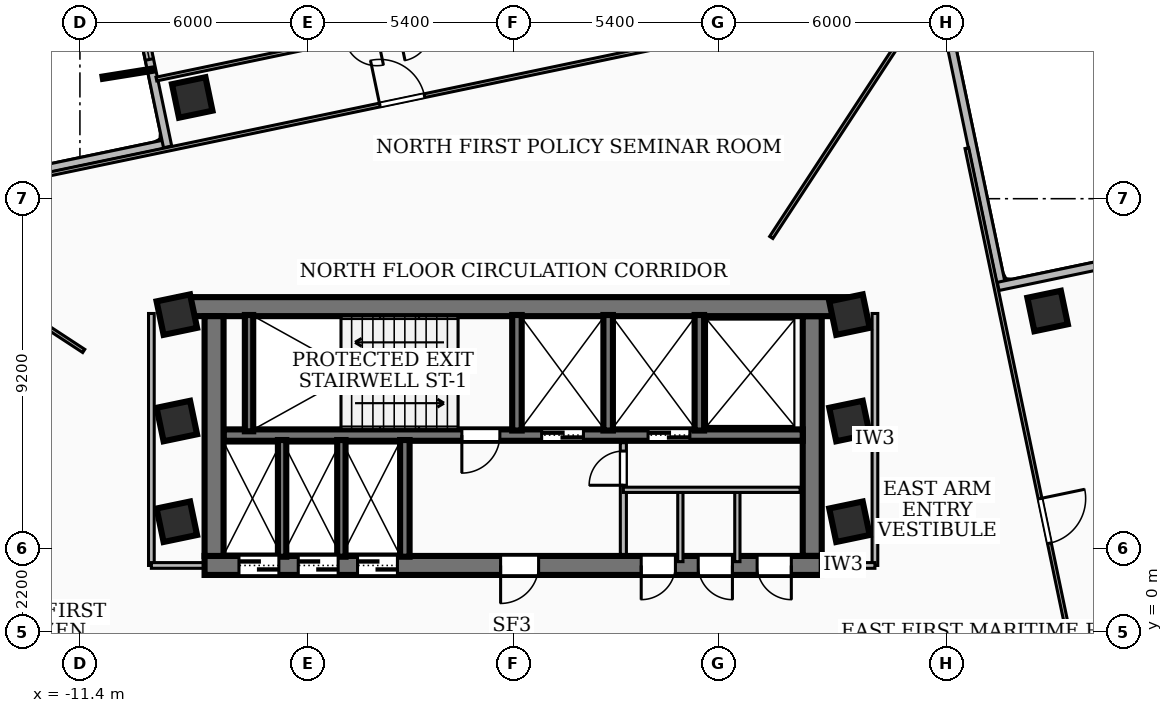
"""IFC4 building model, lengths in metres.
Left out: names, types, materials, properties, quantities, classifications, styles, units other than length and angle.
Written with IfcOpenShell. Run it as: python <this file> out.ifc"""

import sys

from ifc_helpers import new_model, si_unit, direction, frame, frame_2d, origin, origin_2d, place, context, subcontext, project, spatial, rectangle, extrude, element, fill, save


model = new_model("IFC4")
c1 = context("Model", 3, precision=1e-05, world=origin(), true_north=direction((0.0, 1.0)))
c2 = subcontext(c1, "Body", "Model", "MODEL_VIEW")
j1 = project(units=[si_unit("LENGTHUNIT", "METRE"), si_unit("PLANEANGLEUNIT", "RADIAN")], contexts=[c1])
p1 = place(None, origin())
s1 = spatial("IfcSite", under=j1, at=p1, CompositionType="ELEMENT")
p2 = place(p1, origin())
s2 = spatial("IfcBuilding", under=s1, at=p2, CompositionType="ELEMENT")
p3 = place(p2, frame((0.0, 0.0, 111.96)))
s3 = spatial("IfcBuildingStorey", under=s2, at=p3, CompositionType="ELEMENT", Elevation=111.96)
p4 = place(p3, frame((-8.78, 8.56, 0.0), z_axis=(0.0, 0.0, 1.0), x_axis=(1.0, 0.0, 0.0)))
e1 = element("IfcWall", 1, at=p4, inside=s3, PredefinedType="SHEAR", context=c2, shape_type="SweptSolid", body=[
    extrude(rectangle(XDim=17.56, YDim=0.5, at=frame_2d((8.78, 0.0))), origin(), (0.0, 0.0, 1.0), 4.06),
])
p5 = place(p3, frame((8.12, 1.75, 0.0), z_axis=(0.0, 0.0, 1.0), x_axis=(-1.0, 0.0, 0.0)))
e2 = element("IfcWall", 2, at=p5, inside=s3, PredefinedType="SHEAR", context=c2, shape_type="SweptSolid", body=[
    extrude(rectangle(XDim=16.24, YDim=0.5, at=frame_2d((8.12, 0.0))), origin(), (0.0, 0.0, 1.0), 4.06),
])
p6 = place(p5, frame((7.45, 0.0, 0.0)))
e3 = element("IfcOpeningElement", 3, at=p6, cuts=e2, PredefinedType="OPENING", context=c2, shape_type="SweptSolid", body=[
    extrude(rectangle(XDim=1.0, YDim=2.1, at=frame_2d((0.5, 1.05))), frame((0.0, 0.26, 0.0), z_axis=(0.0, -1.0, 0.0), x_axis=(1.0, 0.0, 0.0)), (0.0, 0.0, 1.0), 0.52),
])
p7 = place(p5, frame((14.285, 0.0, 0.0)))
e4 = element("IfcOpeningElement", 4, at=p7, cuts=e2, PredefinedType="OPENING", context=c2, shape_type="SweptSolid", body=[
    extrude(rectangle(XDim=1.05, YDim=2.15, at=frame_2d((0.525, 1.075))), frame((0.0, 0.26, 0.0), z_axis=(0.0, -1.0, 0.0), x_axis=(1.0, 0.0, 0.0)), (0.0, 0.0, 1.0), 0.52),
])
p8 = place(p5, frame((12.725, 0.0, 0.0)))
e5 = element("IfcOpeningElement", 5, at=p8, cuts=e2, PredefinedType="OPENING", context=c2, shape_type="SweptSolid", body=[
    extrude(rectangle(XDim=1.05, YDim=2.15, at=frame_2d((0.525, 1.075))), frame((0.0, 0.26, 0.0), z_axis=(0.0, -1.0, 0.0), x_axis=(1.0, 0.0, 0.0)), (0.0, 0.0, 1.0), 0.52),
])
p9 = place(p5, frame((11.165, 0.0, 0.0)))
e6 = element("IfcOpeningElement", 6, at=p9, cuts=e2, PredefinedType="OPENING", context=c2, shape_type="SweptSolid", body=[
    extrude(rectangle(XDim=1.05, YDim=2.15, at=frame_2d((0.525, 1.075))), frame((0.0, 0.26, 0.0), z_axis=(0.0, -1.0, 0.0), x_axis=(1.0, 0.0, 0.0)), (0.0, 0.0, 1.0), 0.52),
])
p10 = place(p5, frame((3.85, 0.0, 0.0)))
e7 = element("IfcOpeningElement", 7, at=p10, cuts=e2, PredefinedType="OPENING", context=c2, shape_type="SweptSolid", body=[
    extrude(rectangle(XDim=0.9, YDim=2.06, at=frame_2d((0.45, 1.03))), frame((0.0, 0.26, 0.0), z_axis=(0.0, -1.0, 0.0), x_axis=(1.0, 0.0, 0.0)), (0.0, 0.0, 1.0), 0.52),
])
p11 = place(p5, frame((2.35, 0.0, 0.0)))
e8 = element("IfcOpeningElement", 8, at=p11, cuts=e2, PredefinedType="OPENING", context=c2, shape_type="SweptSolid", body=[
    extrude(rectangle(XDim=0.9, YDim=2.06, at=frame_2d((0.45, 1.03))), frame((0.0, 0.26, 0.0), z_axis=(0.0, -1.0, 0.0), x_axis=(1.0, 0.0, 0.0)), (0.0, 0.0, 1.0), 0.52),
])
p12 = place(p5, frame((0.8, 0.0, 0.0)))
e9 = element("IfcOpeningElement", 9, at=p12, cuts=e2, PredefinedType="OPENING", context=c2, shape_type="SweptSolid", body=[
    extrude(rectangle(XDim=0.9, YDim=2.06, at=frame_2d((0.45, 1.03))), frame((0.0, 0.26, 0.0), z_axis=(0.0, -1.0, 0.0), x_axis=(1.0, 0.0, 0.0)), (0.0, 0.0, 1.0), 0.52),
])
for number, where, z_axis, x_axis in (
    (10, (-7.87, 2.0, 0.0), (0.0, 0.0, 1.0), (0.0, 1.0, 0.0)),
    (11, (7.87, 8.31, 0.0), (0.0, 0.0, 1.0), (0.0, -1.0, 0.0)),
):
    element("IfcWall", number, at=place(p3, frame(where, z_axis=z_axis, x_axis=x_axis)), inside=s3, PredefinedType="SHEAR", context=c2, shape_type="SweptSolid", body=[
        extrude(rectangle(XDim=6.31, YDim=0.5, at=frame_2d((3.155, 0.0))), origin(), (0.0, 0.0, 1.0), 4.06),
    ])
p13 = place(p3, frame((7.62, 5.18, 0.0), z_axis=(0.0, 0.0, 1.0), x_axis=(-1.0, 0.0, 0.0)))
e12 = element("IfcWall", 12, at=p13, inside=s3, PredefinedType="SOLIDWALL", context=c2, shape_type="SweptSolid", body=[
    extrude(rectangle(XDim=15.24, YDim=0.3, at=frame_2d((7.62, 0.0))), origin(), (0.0, 0.0, 1.0), 4.06),
])
p14 = place(p13, frame((5.77, 0.0, 0.0)))
e13 = element("IfcOpeningElement", 13, at=p14, cuts=e12, PredefinedType="OPENING", context=c2, shape_type="SweptSolid", body=[
    extrude(rectangle(XDim=1.1, YDim=2.15, at=frame_2d((0.55, 1.075))), frame((0.0, 0.16, 0.0), z_axis=(0.0, -1.0, 0.0), x_axis=(1.0, 0.0, 0.0)), (0.0, 0.0, 1.0), 0.32),
])
p15 = place(p13, frame((2.97, 0.0, 0.0)))
e14 = element("IfcOpeningElement", 14, at=p15, cuts=e12, PredefinedType="OPENING", context=c2, shape_type="SweptSolid", body=[
    extrude(rectangle(XDim=1.1, YDim=2.15, at=frame_2d((0.55, 1.075))), frame((0.0, 0.16, 0.0), z_axis=(0.0, -1.0, 0.0), x_axis=(1.0, 0.0, 0.0)), (0.0, 0.0, 1.0), 0.32),
])
p16 = place(p13, frame((7.97, 0.0, 0.0)))
e15 = element("IfcOpeningElement", 15, at=p16, cuts=e12, PredefinedType="OPENING", context=c2, shape_type="SweptSolid", body=[
    extrude(rectangle(XDim=1.0, YDim=2.1, at=frame_2d((0.5, 1.05))), frame((0.0, 0.16, 0.0), z_axis=(0.0, -1.0, 0.0), x_axis=(1.0, 0.0, 0.0)), (0.0, 0.0, 1.0), 0.32),
])
p17 = place(p3, frame((-6.95, 5.28, 0.0), z_axis=(0.0, 0.0, 1.0), x_axis=(0.0, 1.0, 0.0)))
e16 = element("IfcWall", 16, at=p17, inside=s3, PredefinedType="SOLIDWALL", context=c2, shape_type="SweptSolid", body=[
    extrude(rectangle(XDim=3.06, YDim=0.22, at=frame_2d((1.53, 0.0))), origin(), (0.0, 0.0, 1.0), 4.06),
])
for number, where, z_axis, x_axis in (
    (17, (0.1, 5.3, 0.0), (0.0, 0.0, 1.0), (0.0, 1.0, 0.0)),
    (18, (2.5, 5.3, 0.0), (0.0, 0.0, 1.0), (0.0, 1.0, 0.0)),
    (19, (4.9, 5.3, 0.0), (0.0, 0.0, 1.0), (0.0, 1.0, 0.0)),
):
    element("IfcWall", number, at=place(p3, frame(where, z_axis=z_axis, x_axis=x_axis)), inside=s3, PredefinedType="SOLIDWALL", context=c2, shape_type="SweptSolid", body=[
        extrude(rectangle(XDim=3.04, YDim=0.25, at=frame_2d((1.52, 0.0))), origin(), (0.0, 0.0, 1.0), 4.06),
    ])
p18 = place(p3, frame((-2.85, 1.98, 0.0), z_axis=(0.0, 0.0, 1.0), x_axis=(0.0, 1.0, 0.0)))
e20 = element("IfcWall", 20, at=p18, inside=s3, PredefinedType="SOLIDWALL", context=c2, shape_type="SweptSolid", body=[
    extrude(rectangle(XDim=3.07, YDim=0.25, at=frame_2d((1.535, 0.0))), origin(), (0.0, 0.0, 1.0), 4.06),
])
for number, where, z_axis, x_axis in (
    (21, (-6.08, 1.98, 0.0), (0.0, 0.0, 1.0), (0.0, 1.0, 0.0)),
    (22, (-4.52, 1.98, 0.0), (0.0, 0.0, 1.0), (0.0, 1.0, 0.0)),
):
    element("IfcWall", number, at=place(p3, frame(where, z_axis=z_axis, x_axis=x_axis)), inside=s3, PredefinedType="SOLIDWALL", context=c2, shape_type="SweptSolid", body=[
        extrude(rectangle(XDim=3.07, YDim=0.22, at=frame_2d((1.535, 0.0))), origin(), (0.0, 0.0, 1.0), 4.06),
    ])
for number, where, z_axis, x_axis in (
    (23, (-8.85, 2.9, 0.0), (0.0, 0.0, 1.0), (0.979, 0.204, 0.0)),
    (24, (-8.85, 5.55, 0.0), (0.0, 0.0, 1.0), (0.979, 0.204, 0.0)),
    (25, (8.85, 2.9, 0.0), (0.0, 0.0, 1.0), (0.979, 0.204, 0.0)),
    (26, (8.85, 5.55, 0.0), (0.0, 0.0, 1.0), (0.979, 0.204, 0.0)),
    (27, (-8.85, 8.35, 0.0), (0.0, 0.0, 1.0), (0.979, 0.204, 0.0)),
    (28, (8.85, 8.35, 0.0), (0.0, 0.0, 1.0), (0.979, 0.204, 0.0)),
    (29, (14.064, 8.445, 0.0), (0.0, 0.0, 1.0), (0.979, 0.204, 0.0)),
    (30, (-8.445, 14.064, 0.0), (0.0, 0.0, 1.0), (0.979, 0.204, 0.0)),
):
    element("IfcColumn", number, at=place(p3, frame(where, z_axis=z_axis, x_axis=x_axis)), inside=s3, PredefinedType="COLUMN", context=c2, shape_type="SweptSolid", body=[
        extrude(rectangle(XDim=0.9, YDim=0.9, at=origin_2d()), origin(), (0.0, 0.0, 1.0), 4.32),
    ])
p19 = place(p3, frame((-15.639, 11.485, 0.0), z_axis=(0.0, 0.0, 1.0), x_axis=(0.978870573598, 0.204480806295, 0.0)))
e31 = element("IfcWall", 31, at=p19, inside=s3, PredefinedType="SOLIDWALL", context=c2, shape_type="SweptSolid", body=[
    extrude(rectangle(XDim=6.758, YDim=0.22, at=frame_2d((3.379, 0.0))), origin(), (0.0, 0.0, 1.0), 4.06),
])
p20 = place(p3, frame((-9.092, 12.763, 0.0), z_axis=(0.0, 0.0, 1.0), x_axis=(-0.204463355867, 0.978874218737, 0.0)))
e32 = element("IfcWall", 32, at=p20, inside=s3, PredefinedType="SOLIDWALL", context=c2, shape_type="SweptSolid", body=[
    extrude(rectangle(XDim=10.858, YDim=0.22, at=frame_2d((5.429, 0.0))), origin(), (0.0, 0.0, 1.0), 4.06),
])
p21 = place(p20, frame((2.35, 0.0, 0.85)))
e33 = element("IfcOpeningElement", 33, at=p21, cuts=e32, PredefinedType="OPENING", context=c2, shape_type="SweptSolid", body=[
    extrude(rectangle(XDim=2.1, YDim=1.8, at=frame_2d((1.05, 0.9))), frame((0.0, 0.12, 0.0), z_axis=(0.0, -1.0, 0.0), x_axis=(1.0, 0.0, 0.0)), (0.0, 0.0, 1.0), 0.24),
])
p22 = place(p3, frame((11.485, 15.639, 0.0), z_axis=(0.0, 0.0, 1.0), x_axis=(0.204480806295, -0.978870573598, 0.0)))
e34 = element("IfcWall", 34, at=p22, inside=s3, PredefinedType="SOLIDWALL", context=c2, shape_type="SweptSolid", body=[
    extrude(rectangle(XDim=6.758, YDim=0.22, at=frame_2d((3.379, 0.0))), origin(), (0.0, 0.0, 1.0), 4.06),
])
p23 = place(p3, frame((12.763, 9.092, 0.0), z_axis=(0.0, 0.0, 1.0), x_axis=(0.97886813171, 0.204492495517, 0.0)))
e35 = element("IfcWall", 35, at=p23, inside=s3, PredefinedType="SOLIDWALL", context=c2, shape_type="SweptSolid", body=[
    extrude(rectangle(XDim=13.458, YDim=0.22, at=frame_2d((6.729, 0.0))), origin(), (0.0, 0.0, 1.0), 4.06),
])
p24 = place(p23, frame((10.257, 0.0, 0.85)))
e36 = element("IfcOpeningElement", 36, at=p24, cuts=e35, PredefinedType="OPENING", context=c2, shape_type="SweptSolid", body=[
    extrude(rectangle(XDim=2.1, YDim=1.6, at=frame_2d((1.05, 0.8))), frame((0.0, 0.12, 0.0), z_axis=(0.0, -1.0, 0.0), x_axis=(1.0, 0.0, 0.0)), (0.0, 0.0, 1.0), 0.24),
])
p25 = place(p3, frame((2.9, 2.04, 0.0), z_axis=(0.0, 0.0, 1.0), x_axis=(0.0, 1.0, 0.0)))
e37 = element("IfcWall", 37, at=p25, inside=s3, PredefinedType="PARTITIONING", context=c2, shape_type="SweptSolid", body=[
    extrude(rectangle(XDim=2.94, YDim=0.16, at=frame_2d((1.47, 0.0))), origin(), (0.0, 0.0, 1.0), 3.29),
])
p26 = place(p25, frame((1.82, 0.0, 0.0)))
e38 = element("IfcOpeningElement", 38, at=p26, cuts=e37, PredefinedType="OPENING", context=c2, shape_type="SweptSolid", body=[
    extrude(rectangle(XDim=0.9, YDim=2.06, at=frame_2d((0.45, 1.03))), frame((0.0, 0.09, 0.0), z_axis=(0.0, -1.0, 0.0), x_axis=(1.0, 0.0, 0.0)), (0.0, 0.0, 1.0), 0.18),
])
p27 = place(p3, frame((2.9, 3.74, 0.0), z_axis=(0.0, 0.0, 1.0), x_axis=(1.0, 0.0, 0.0)))
e39 = element("IfcWall", 39, at=p27, inside=s3, PredefinedType="PARTITIONING", context=c2, shape_type="SweptSolid", body=[
    extrude(rectangle(XDim=4.65, YDim=0.138, at=frame_2d((2.325, 0.0))), origin(), (0.0, 0.0, 1.0), 4.06),
])
for number, where, z_axis, x_axis in (
    (40, (4.4, 1.85, 0.0), (0.0, 0.0, 1.0), (0.0, 1.0, 0.0)),
    (41, (5.9, 1.85, 0.0), (0.0, 0.0, 1.0), (0.0, 1.0, 0.0)),
):
    element("IfcWall", number, at=place(p3, frame(where, z_axis=z_axis, x_axis=x_axis)), inside=s3, PredefinedType="PARTITIONING", context=c2, shape_type="SweptSolid", body=[
        extrude(rectangle(XDim=1.89, YDim=0.138, at=frame_2d((0.945, 0.0))), origin(), (0.0, 0.0, 1.0), 3.29),
    ])
p28 = place(p3, frame((-9.52, 1.75, 0.0), z_axis=(0.0, 0.0, 1.0), x_axis=(0.0, 1.0, 0.0)))
e42 = element("IfcWall", 42, at=p28, inside=s3, PredefinedType="PARTITIONING", context=c2, shape_type="SweptSolid", body=[
    extrude(rectangle(XDim=6.63, YDim=0.15, at=frame_2d((3.315, 0.0))), origin(), (0.0, 0.0, 1.0), 3.29),
])
p29 = place(p3, frame((-7.85, 1.75, 0.0), z_axis=(0.0, 0.0, 1.0), x_axis=(-1.0, 0.0, 0.0)))
e43 = element("IfcWall", 43, at=p29, inside=s3, PredefinedType="PARTITIONING", context=c2, shape_type="SweptSolid", body=[
    extrude(rectangle(XDim=1.67, YDim=0.15, at=frame_2d((0.835, 0.0))), origin(), (0.0, 0.0, 1.0), 3.29),
])
p30 = place(p3, frame((9.52, 1.75, 0.0), z_axis=(0.0, 0.0, 1.0), x_axis=(0.0, 1.0, 0.0)))
e44 = element("IfcWall", 44, at=p30, inside=s3, PredefinedType="PARTITIONING", context=c2, shape_type="SweptSolid", body=[
    extrude(rectangle(XDim=6.63, YDim=0.15, at=frame_2d((3.315, 0.0))), origin(), (0.0, 0.0, 1.0), 3.29),
])
p31 = place(p3, frame((7.85, 1.75, 0.0), z_axis=(0.0, 0.0, 1.0), x_axis=(1.0, 0.0, 0.0)))
e45 = element("IfcWall", 45, at=p31, inside=s3, PredefinedType="PARTITIONING", context=c2, shape_type="SweptSolid", body=[
    extrude(rectangle(XDim=1.67, YDim=0.15, at=frame_2d((0.835, 0.0))), origin(), (0.0, 0.0, 1.0), 3.29),
])
p32 = place(p3, frame((6.792, 10.38, 0.0), z_axis=(0.0, 0.0, 1.0), x_axis=(0.547596764532, 0.836742363858, 0.0)))
e46 = element("IfcWall", 46, at=p32, inside=s3, PredefinedType="PARTITIONING", context=c2, shape_type="SweptSolid", body=[
    extrude(rectangle(XDim=7.27, YDim=0.1, at=frame_2d((3.635, 0.0))), origin(), (0.0, 0.0, 1.0), 3.29),
])
p33 = place(p3, frame((-11.3, 7.394, 0.0), z_axis=(0.0, 0.0, 1.0), x_axis=(-0.836731843599, 0.547612839429, 0.0)))
e47 = element("IfcWall", 47, at=p33, inside=s3, PredefinedType="PARTITIONING", context=c2, shape_type="SweptSolid", body=[
    extrude(rectangle(XDim=6.17, YDim=0.1, at=frame_2d((3.085, 0.0))), origin(), (0.0, 0.0, 1.0), 4.06),
])
p34 = place(p3, frame((11.939, 12.73, 0.0), z_axis=(0.0, 0.0, 1.0), x_axis=(0.204503489908, -0.978865834839, 0.0)))
e48 = element("IfcWall", 48, at=p34, inside=s3, PredefinedType="PARTITIONING", context=c2, shape_type="SweptSolid", body=[
    extrude(rectangle(XDim=20.04, YDim=0.1, at=frame_2d((10.02, 0.0))), origin(), (0.0, 0.0, 1.0), 3.29),
])
p35 = place(p34, frame((9.42, 0.0, 0.0)))
e49 = element("IfcOpeningElement", 49, at=p35, cuts=e48, PredefinedType="OPENING", context=c2, shape_type="SweptSolid", body=[
    extrude(rectangle(XDim=1.2, YDim=2.1, at=frame_2d((0.6, 1.05))), frame((0.0, 0.06, 0.0), z_axis=(0.0, -1.0, 0.0), x_axis=(1.0, 0.0, 0.0)), (0.0, 0.0, 1.0), 0.12),
])
p36 = place(p3, frame((-12.73, 11.939, 0.0), z_axis=(0.0, 0.0, 1.0), x_axis=(0.978865834839, 0.204503489908, 0.0)))
e50 = element("IfcWall", 50, at=p36, inside=s3, PredefinedType="PARTITIONING", context=c2, shape_type="SweptSolid", body=[
    extrude(rectangle(XDim=20.04, YDim=0.1, at=frame_2d((10.02, 0.0))), origin(), (0.0, 0.0, 1.0), 3.29),
])
p37 = place(p36, frame((9.42, 0.0, 0.0)))
e51 = element("IfcOpeningElement", 51, at=p37, cuts=e50, PredefinedType="OPENING", context=c2, shape_type="SweptSolid", body=[
    extrude(rectangle(XDim=1.2, YDim=2.1, at=frame_2d((0.6, 1.05))), frame((0.0, 0.06, 0.0), z_axis=(0.0, -1.0, 0.0), x_axis=(1.0, 0.0, 0.0)), (0.0, 0.0, 1.0), 0.12),
])
p38 = place(p3, frame((2.779, 17.089, 0.0), z_axis=(0.0, 0.0, 1.0), x_axis=(-0.978880294364, -0.204434266469, 0.0)))
e52 = element("IfcWall", 52, at=p38, inside=s3, PredefinedType="PARTITIONING", context=c2, shape_type="SweptSolid", body=[
    extrude(rectangle(XDim=12.429, YDim=0.1, at=frame_2d((6.215, 0.0))), origin(), (0.0, 0.0, 1.0), 3.29),
])
p39 = place(p38, frame((5.065, 0.0, 0.0)))
e53 = element("IfcOpeningElement", 53, at=p39, cuts=e52, PredefinedType="OPENING", context=c2, shape_type="SweptSolid", body=[
    extrude(rectangle(XDim=0.86, YDim=2.04, at=frame_2d((0.43, 1.02))), frame((0.0, 0.06, 0.0), z_axis=(0.0, -1.0, 0.0), x_axis=(1.0, 0.0, 0.0)), (0.0, 0.0, 1.0), 0.12),
])
p40 = place(p38, frame((6.505, 0.0, 0.0)))
e54 = element("IfcOpeningElement", 54, at=p40, cuts=e52, PredefinedType="OPENING", context=c2, shape_type="SweptSolid", body=[
    extrude(rectangle(XDim=0.86, YDim=2.04, at=frame_2d((0.43, 1.02))), frame((0.0, 0.06, 0.0), z_axis=(0.0, -1.0, 0.0), x_axis=(1.0, 0.0, 0.0)), (0.0, 0.0, 1.0), 0.12),
])
p41 = place(p3, frame((-11.939, -12.73, 0.0), z_axis=(0.0, 0.0, 1.0), x_axis=(-0.204503489908, 0.978865834839, 0.0)))
e55 = element("IfcWall", 55, at=p41, inside=s3, PredefinedType="PARTITIONING", context=c2, shape_type="SweptSolid", body=[
    extrude(rectangle(XDim=20.04, YDim=0.1, at=frame_2d((10.02, 0.0))), origin(), (0.0, 0.0, 1.0), 3.29),
])
p42 = place(p41, frame((9.42, 0.0, 0.0)))
e56 = element("IfcOpeningElement", 56, at=p42, cuts=e55, PredefinedType="OPENING", context=c2, shape_type="SweptSolid", body=[
    extrude(rectangle(XDim=1.2, YDim=2.1, at=frame_2d((0.6, 1.05))), frame((0.0, 0.06, 0.0), z_axis=(0.0, -1.0, 0.0), x_axis=(1.0, 0.0, 0.0)), (0.0, 0.0, 1.0), 0.12),
])
p43 = place(p21, origin())
e57 = element("IfcWindow", 57, at=p43, inside=s3, PartitioningType="SINGLE_PANEL", PredefinedType="WINDOW", context=c2, shape_type="SweptSolid", body=[
    extrude(rectangle(XDim=2.1, YDim=1.8, at=frame_2d((1.05, 0.9))), frame((0.0, 0.03, 0.0), z_axis=(0.0, -1.0, 0.0), x_axis=(1.0, 0.0, 0.0)), (0.0, 0.0, 1.0), 0.06),
])
fill(e33, e57)
p44 = place(p6, origin())
e58 = element("IfcDoor", 58, at=p44, inside=s3, OperationType="SINGLE_SWING_RIGHT", PredefinedType="DOOR", context=c2, shape_type="SweptSolid", body=[
    extrude(rectangle(XDim=1.0, YDim=2.1, at=frame_2d((0.5, 1.05))), frame((0.0, 0.025, 0.0), z_axis=(0.0, -1.0, 0.0), x_axis=(1.0, 0.0, 0.0)), (0.0, 0.0, 1.0), 0.05),
])
fill(e3, e58)
p45 = place(p14, origin())
e59 = element("IfcDoor", 59, at=p45, inside=s3, OperationType="DOUBLE_DOOR_SLIDING", PredefinedType="DOOR", context=c2, shape_type="SweptSolid", body=[
    extrude(rectangle(XDim=1.1, YDim=2.15, at=frame_2d((0.55, 1.075))), frame((0.0, 0.025, 0.0), z_axis=(0.0, -1.0, 0.0), x_axis=(1.0, 0.0, 0.0)), (0.0, 0.0, 1.0), 0.05),
])
fill(e13, e59)
p46 = place(p15, origin())
e60 = element("IfcDoor", 60, at=p46, inside=s3, OperationType="DOUBLE_DOOR_SLIDING", PredefinedType="DOOR", context=c2, shape_type="SweptSolid", body=[
    extrude(rectangle(XDim=1.1, YDim=2.15, at=frame_2d((0.55, 1.075))), frame((0.0, 0.025, 0.0), z_axis=(0.0, -1.0, 0.0), x_axis=(1.0, 0.0, 0.0)), (0.0, 0.0, 1.0), 0.05),
])
fill(e14, e60)
p47 = place(p16, origin())
e61 = element("IfcDoor", 61, at=p47, inside=s3, OperationType="SINGLE_SWING_RIGHT", PredefinedType="DOOR", context=c2, shape_type="SweptSolid", body=[
    extrude(rectangle(XDim=1.0, YDim=2.1, at=frame_2d((0.5, 1.05))), frame((0.0, 0.025, 0.0), z_axis=(0.0, -1.0, 0.0), x_axis=(1.0, 0.0, 0.0)), (0.0, 0.0, 1.0), 0.05),
])
fill(e15, e61)
p48 = place(p7, origin())
e62 = element("IfcDoor", 62, at=p48, inside=s3, OperationType="DOUBLE_DOOR_SLIDING", PredefinedType="DOOR", context=c2, shape_type="SweptSolid", body=[
    extrude(rectangle(XDim=1.05, YDim=2.15, at=frame_2d((0.525, 1.075))), frame((0.0, 0.025, 0.0), z_axis=(0.0, -1.0, 0.0), x_axis=(1.0, 0.0, 0.0)), (0.0, 0.0, 1.0), 0.05),
])
fill(e4, e62)
p49 = place(p8, origin())
e63 = element("IfcDoor", 63, at=p49, inside=s3, OperationType="DOUBLE_DOOR_SLIDING", PredefinedType="DOOR", context=c2, shape_type="SweptSolid", body=[
    extrude(rectangle(XDim=1.05, YDim=2.15, at=frame_2d((0.525, 1.075))), frame((0.0, 0.025, 0.0), z_axis=(0.0, -1.0, 0.0), x_axis=(1.0, 0.0, 0.0)), (0.0, 0.0, 1.0), 0.05),
])
fill(e5, e63)
p50 = place(p9, origin())
e64 = element("IfcDoor", 64, at=p50, inside=s3, OperationType="DOUBLE_DOOR_SLIDING", PredefinedType="DOOR", context=c2, shape_type="SweptSolid", body=[
    extrude(rectangle(XDim=1.05, YDim=2.15, at=frame_2d((0.525, 1.075))), frame((0.0, 0.025, 0.0), z_axis=(0.0, -1.0, 0.0), x_axis=(1.0, 0.0, 0.0)), (0.0, 0.0, 1.0), 0.05),
])
fill(e6, e64)
p51 = place(p10, origin())
e65 = element("IfcDoor", 65, at=p51, inside=s3, OperationType="SINGLE_SWING_RIGHT", PredefinedType="DOOR", context=c2, shape_type="SweptSolid", body=[
    extrude(rectangle(XDim=0.9, YDim=2.06, at=frame_2d((0.45, 1.03))), frame((0.0, 0.025, 0.0), z_axis=(0.0, -1.0, 0.0), x_axis=(1.0, 0.0, 0.0)), (0.0, 0.0, 1.0), 0.05),
])
fill(e7, e65)
p52 = place(p11, origin())
e66 = element("IfcDoor", 66, at=p52, inside=s3, OperationType="SINGLE_SWING_LEFT", PredefinedType="DOOR", context=c2, shape_type="SweptSolid", body=[
    extrude(rectangle(XDim=0.9, YDim=2.06, at=frame_2d((0.45, 1.03))), frame((0.0, 0.025, 0.0), z_axis=(0.0, -1.0, 0.0), x_axis=(1.0, 0.0, 0.0)), (0.0, 0.0, 1.0), 0.05),
])
fill(e8, e66)
p53 = place(p12, origin())
e67 = element("IfcDoor", 67, at=p53, inside=s3, OperationType="SINGLE_SWING_LEFT", PredefinedType="DOOR", context=c2, shape_type="SweptSolid", body=[
    extrude(rectangle(XDim=0.9, YDim=2.06, at=frame_2d((0.45, 1.03))), frame((0.0, 0.025, 0.0), z_axis=(0.0, -1.0, 0.0), x_axis=(1.0, 0.0, 0.0)), (0.0, 0.0, 1.0), 0.05),
])
fill(e9, e67)
p54 = place(p26, origin())
e68 = element("IfcDoor", 68, at=p54, inside=s3, OperationType="SINGLE_SWING_LEFT", PredefinedType="DOOR", context=c2, shape_type="SweptSolid", body=[
    extrude(rectangle(XDim=0.9, YDim=2.06, at=frame_2d((0.45, 1.03))), frame((0.0, 0.025, 0.0), z_axis=(0.0, -1.0, 0.0), x_axis=(1.0, 0.0, 0.0)), (0.0, 0.0, 1.0), 0.05),
])
fill(e38, e68)
p55 = place(p35, origin())
e69 = element("IfcDoor", 69, at=p55, inside=s3, OperationType="SINGLE_SWING_LEFT", PredefinedType="DOOR", context=c2, shape_type="SweptSolid", body=[
    extrude(rectangle(XDim=1.2, YDim=2.1, at=frame_2d((0.6, 1.05))), frame((0.0, 0.025, 0.0), z_axis=(0.0, -1.0, 0.0), x_axis=(1.0, 0.0, 0.0)), (0.0, 0.0, 1.0), 0.05),
])
fill(e49, e69)
p56 = place(p37, origin())
e70 = element("IfcDoor", 70, at=p56, inside=s3, OperationType="SINGLE_SWING_LEFT", PredefinedType="DOOR", context=c2, shape_type="SweptSolid", body=[
    extrude(rectangle(XDim=1.2, YDim=2.1, at=frame_2d((0.6, 1.05))), frame((0.0, 0.025, 0.0), z_axis=(0.0, -1.0, 0.0), x_axis=(1.0, 0.0, 0.0)), (0.0, 0.0, 1.0), 0.05),
])
fill(e51, e70)
save(model, sys.argv[1])
